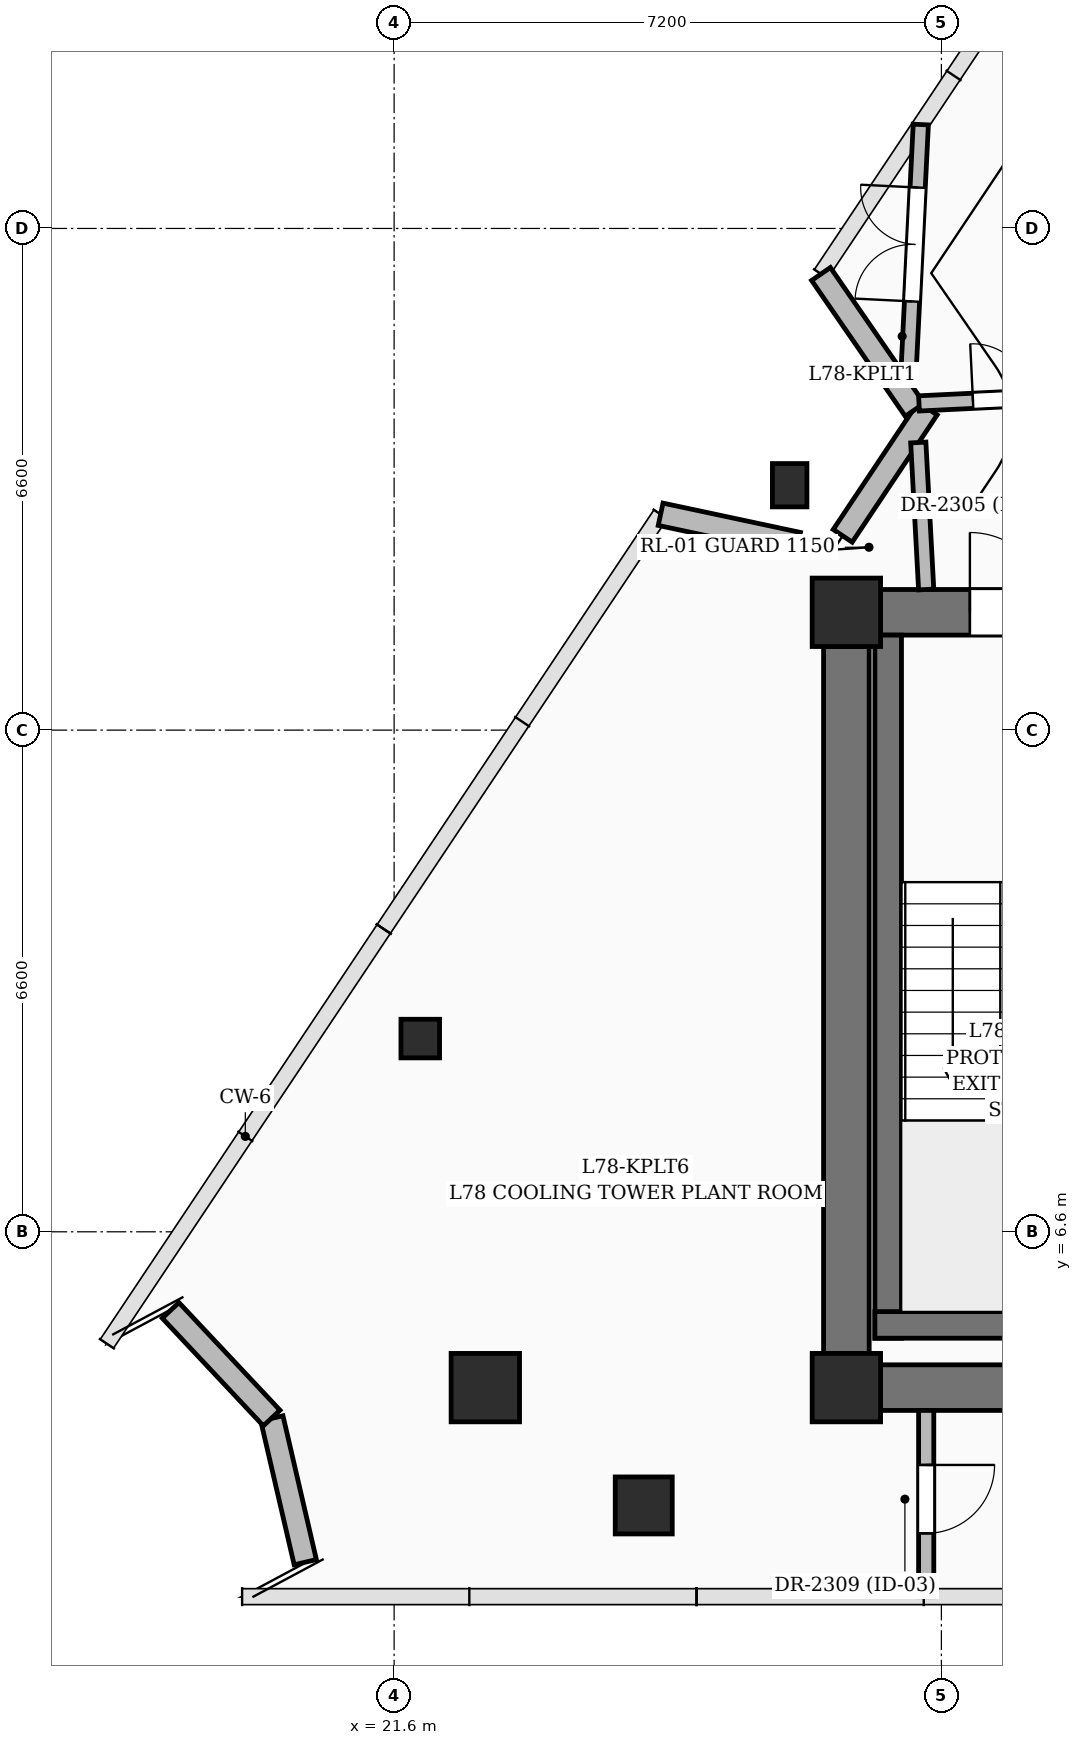
"""IFC4 building model, lengths in metres.
Left out: names, types, materials, properties, quantities, classifications, styles, units other than length and angle.
Written with IfcOpenShell. Run it as: python <this file> out.ifc"""

import sys

from ifc_helpers import new_model, si_unit, direction, frame, frame_2d, origin, origin_2d, place, context, subcontext, project, spatial, rectangle, hollow_circle, i_section, extrude, element, fill, save


model = new_model("IFC4")
c1 = context("Model", 3, precision=1e-05, world=origin(), true_north=direction((0.0, 1.0)))
c2 = subcontext(c1, "Body", "Model", "MODEL_VIEW")
j1 = project(units=[si_unit("LENGTHUNIT", "METRE"), si_unit("PLANEANGLEUNIT", "RADIAN")], contexts=[c1])
p1 = place(None, origin())
s1 = spatial("IfcSite", under=j1, at=p1, CompositionType="ELEMENT")
p2 = place(p1, origin())
s2 = spatial("IfcBuilding", under=s1, at=p2, CompositionType="ELEMENT")
p3 = place(p2, frame((0.0, 0.0, 302.5)))
s3 = spatial("IfcBuildingStorey", under=s2, at=p3, CompositionType="ELEMENT", Elevation=302.5)
for number, where, z_axis, x_axis in (
    (1, (27.55, 4.55, 0.0), (0.0, 0.0, 1.0), (1.0, 0.0, 0.0)),
    (2, (27.55, 14.75, 0.0), (0.0, 0.0, 1.0), (1.0, 0.0, 0.0)),
    (3, (22.8, 4.55, 0.0), (0.0, 0.0, 1.0), (1.0, 0.0, 0.0)),
):
    element("IfcColumn", number, at=place(p3, frame(where, z_axis=z_axis, x_axis=x_axis)), inside=s3, PredefinedType="COLUMN", context=c2, shape_type="SweptSolid", body=[
        extrude(rectangle(XDim=0.9, YDim=0.9, at=origin_2d()), origin(), (0.0, 0.0, 1.0), 4.0),
    ])
p4 = place(p3, frame((28.0, 4.55, 0.0), z_axis=(0.0, 0.0, 1.0), x_axis=(1.0, 0.0, 0.0)))
e4 = element("IfcWall", 4, at=p4, inside=s3, PredefinedType="SHEAR", context=c2, shape_type="SweptSolid", body=[
    extrude(rectangle(XDim=6.7, YDim=0.6, at=frame_2d((3.35, 0.0))), origin(), (0.0, 0.0, 1.0), 4.0),
])
p5 = place(p3, frame((28.0, 14.75, 0.0), z_axis=(0.0, 0.0, 1.0), x_axis=(1.0, 0.0, 0.0)))
e5 = element("IfcWall", 5, at=p5, inside=s3, PredefinedType="SHEAR", context=c2, shape_type="SweptSolid", body=[
    extrude(rectangle(XDim=6.7, YDim=0.6, at=frame_2d((3.35, 0.0))), origin(), (0.0, 0.0, 1.0), 4.0),
])
p6 = place(p5, frame((1.175, 0.0, 0.0)))
e6 = element("IfcOpeningElement", 6, at=p6, cuts=e5, PredefinedType="OPENING", context=c2, shape_type="SweptSolid", body=[
    extrude(rectangle(XDim=1.05, YDim=2.15, at=frame_2d((0.525, 1.075))), frame((0.0, 0.31, 0.0), z_axis=(0.0, -1.0, 0.0), x_axis=(1.0, 0.0, 0.0)), (0.0, 0.0, 1.0), 0.62),
])
p7 = place(p5, frame((5.025, 0.0, 0.0)))
e7 = element("IfcOpeningElement", 7, at=p7, cuts=e5, PredefinedType="OPENING", context=c2, shape_type="SweptSolid", body=[
    extrude(rectangle(XDim=0.95, YDim=2.15, at=frame_2d((0.475, 1.075))), frame((0.0, 0.31, 0.0), z_axis=(0.0, -1.0, 0.0), x_axis=(1.0, 0.0, 0.0)), (0.0, 0.0, 1.0), 0.62),
])
p8 = place(p3, frame((27.55, 5.0, 0.0), z_axis=(0.0, 0.0, 1.0), x_axis=(0.0, 1.0, 0.0)))
e8 = element("IfcWall", 8, at=p8, inside=s3, PredefinedType="SHEAR", context=c2, shape_type="SweptSolid", body=[
    extrude(rectangle(XDim=9.3, YDim=0.6, at=frame_2d((4.65, 0.0))), origin(), (0.0, 0.0, 1.0), 4.0),
])
p9 = place(p3, frame((28.1, 5.2, 0.0), z_axis=(0.0, 0.0, 1.0), x_axis=(0.0, 1.0, 0.0)))
e9 = element("IfcWall", 9, at=p9, inside=s3, PredefinedType="SOLIDWALL", context=c2, shape_type="SweptSolid", body=[
    extrude(rectangle(XDim=9.25, YDim=0.35, at=frame_2d((4.625, 0.0))), origin(), (0.0, 0.0, 1.0), 4.0),
])
p10 = place(p3, frame((27.925, 5.375, 0.0), z_axis=(0.0, 0.0, 1.0), x_axis=(1.0, 0.0, 0.0)))
e10 = element("IfcWall", 10, at=p10, inside=s3, PredefinedType="SOLIDWALL", context=c2, shape_type="SweptSolid", body=[
    extrude(rectangle(XDim=3.55, YDim=0.35, at=frame_2d((1.775, 0.0))), origin(), (0.0, 0.0, 1.0), 4.0),
])
p11 = place(p3, frame((24.884, 3.0, 0.0), z_axis=(0.0, 0.0, 1.0), x_axis=(1.0, 0.0, 0.0)))
e11 = element("IfcColumn", 11, at=p11, inside=s3, PredefinedType="COLUMN", context=c2, shape_type="SweptSolid", body=[
    extrude(rectangle(XDim=0.75, YDim=0.75, at=origin_2d()), origin(), (0.0, 0.0, 1.0), 4.0),
])
p12 = place(p3, frame((26.804, 16.422, 0.0), z_axis=(0.0, 0.0, 1.0), x_axis=(1.0, 0.0, 0.0)))
e12 = element("IfcColumn", 12, at=p12, inside=s3, PredefinedType="COLUMN", context=c2, shape_type="SweptSolid", body=[
    extrude(i_section(OverallWidth=0.454, OverallDepth=0.57, WebThickness=0.078, FlangeThickness=0.094, FilletRadius=0.02, at=origin_2d()), origin(), (0.0, 0.0, 1.0), 4.0),
])
p13 = place(p3, frame((21.944, 9.142, 0.0), z_axis=(0.0, 0.0, 1.0), x_axis=(1.0, 0.0, 0.0)))
e13 = element("IfcColumn", 13, at=p13, inside=s3, PredefinedType="COLUMN", context=c2, shape_type="SweptSolid", body=[
    extrude(hollow_circle(Radius=0.254, WallThickness=0.016, at=origin_2d()), origin(), (0.0, 0.0, 1.0), 4.0),
])
p14 = place(p3, frame((25.106, 16.04, 0.0), z_axis=(0.0, 0.0, 1.0), x_axis=(0.978002892231, -0.208591329607, 0.0)))
e14 = element("IfcWall", 14, at=p14, inside=s3, PredefinedType="SOLIDWALL", context=c2, shape_type="SweptSolid", body=[
    extrude(rectangle(XDim=1.849, YDim=0.3, at=frame_2d((0.925, 0.0))), origin(), (0.0, 0.0, 1.0), 2.982),
])
p15 = place(p3, frame((27.502, 15.756, 0.0), z_axis=(0.0, 0.0, 1.0), x_axis=(0.555175962623, 0.831732920189, 0.0)))
e15 = element("IfcWall", 15, at=p15, inside=s3, PredefinedType="SOLIDWALL", context=c2, shape_type="SweptSolid", body=[
    extrude(rectangle(XDim=2.013, YDim=0.3, at=frame_2d((1.006, 0.0))), origin(), (0.0, 0.0, 1.0), 3.04),
])
p16 = place(p3, frame((28.448, 17.414, 0.0), z_axis=(0.0, 0.0, 1.0), x_axis=(-0.56781706626, 0.823154772363, 0.0)))
e16 = element("IfcWall", 16, at=p16, inside=s3, PredefinedType="SOLIDWALL", context=c2, shape_type="SweptSolid", body=[
    extrude(rectangle(XDim=2.17, YDim=0.3, at=frame_2d((1.085, 0.0))), origin(), (0.0, 0.0, 1.0), 2.982),
])
p17 = place(p3, frame((20.431, 2.253, 0.0), z_axis=(0.0, 0.0, 1.0), x_axis=(-0.226355436514, 0.97404477123, 0.0)))
e17 = element("IfcWall", 17, at=p17, inside=s3, PredefinedType="SOLIDWALL", context=c2, shape_type="SweptSolid", body=[
    extrude(rectangle(XDim=1.943, YDim=0.3, at=frame_2d((0.971, 0.0))), origin(), (0.0, 0.0, 1.0), 3.7),
])
p18 = place(p3, frame((19.989, 4.15, 0.0), z_axis=(0.0, 0.0, 1.0), x_axis=(-0.684517683679, 0.728996255636, 0.0)))
e18 = element("IfcWall", 18, at=p18, inside=s3, PredefinedType="SOLIDWALL", context=c2, shape_type="SweptSolid", body=[
    extrude(rectangle(XDim=1.943, YDim=0.3, at=frame_2d((0.972, 0.0))), origin(), (0.0, 0.0, 1.0), 3.7),
])
p19 = place(p3, frame((28.362, 17.795, 0.0), z_axis=(0.0, 0.0, 1.0), x_axis=(0.049461540964, 0.99877602893, 0.0)))
e19 = element("IfcWall", 19, at=p19, inside=s3, PredefinedType="PARTITIONING", context=c2, shape_type="SweptSolid", body=[
    extrude(rectangle(XDim=3.376, YDim=0.2, at=frame_2d((1.688, 0.0))), origin(), (0.0, 0.0, 1.0), 2.977),
])
p20 = place(p19, frame((1.046, 0.0, 0.0)))
e20 = element("IfcOpeningElement", 20, at=p20, cuts=e19, PredefinedType="OPENING", context=c2, shape_type="SweptSolid", body=[
    extrude(rectangle(XDim=1.5, YDim=2.2, at=frame_2d((0.75, 1.1))), frame((0.0, 0.11, 0.0), z_axis=(0.0, -1.0, 0.0), x_axis=(1.0, 0.0, 0.0)), (0.0, 0.0, 1.0), 0.22),
])
p21 = place(p3, frame((28.6, 4.25, 0.0), z_axis=(0.0, 0.0, 1.0), x_axis=(0.0, -1.0, 0.0)))
e21 = element("IfcWall", 21, at=p21, inside=s3, PredefinedType="PARTITIONING", context=c2, shape_type="SweptSolid", body=[
    extrude(rectangle(XDim=2.45, YDim=0.2, at=frame_2d((1.225, 0.0))), origin(), (0.0, 0.0, 1.0), 2.977),
])
p22 = place(p21, frame((0.717, 0.0, 0.0)))
e22 = element("IfcOpeningElement", 22, at=p22, cuts=e21, PredefinedType="OPENING", context=c2, shape_type="SweptSolid", body=[
    extrude(rectangle(XDim=0.9, YDim=2.1, at=frame_2d((0.45, 1.05))), frame((0.0, 0.11, 0.0), z_axis=(0.0, -1.0, 0.0), x_axis=(1.0, 0.0, 0.0)), (0.0, 0.0, 1.0), 0.22),
])
p23 = place(p3, frame((28.505, 17.498, 0.0), z_axis=(0.0, 0.0, 1.0), x_axis=(0.998829596157, 0.04836773553, 0.0)))
e23 = element("IfcWall", 23, at=p23, inside=s3, PredefinedType="PARTITIONING", context=c2, shape_type="SweptSolid", body=[
    extrude(rectangle(XDim=3.064, YDim=0.2, at=frame_2d((1.532, 0.0))), origin(), (0.0, 0.0, 1.0), 3.035),
])
p24 = place(p23, frame((0.711, 0.0, 0.0)))
e24 = element("IfcOpeningElement", 24, at=p24, cuts=e23, PredefinedType="OPENING", context=c2, shape_type="SweptSolid", body=[
    extrude(rectangle(XDim=1.5, YDim=2.2, at=frame_2d((0.75, 1.1))), frame((0.0, 0.11, 0.0), z_axis=(0.0, -1.0, 0.0), x_axis=(1.0, 0.0, 0.0)), (0.0, 0.0, 1.0), 0.22),
])
p25 = place(p3, frame((28.496, 16.984, 0.0), z_axis=(0.0, 0.0, 1.0), x_axis=(0.053703478209, -0.998556926984, 0.0)))
e25 = element("IfcWall", 25, at=p25, inside=s3, PredefinedType="PARTITIONING", context=c2, shape_type="SweptSolid", body=[
    extrude(rectangle(XDim=1.937, YDim=0.2, at=frame_2d((0.968, 0.0))), origin(), (0.0, 0.0, 1.0), 3.035),
])
p26 = place(p6, origin())
e26 = element("IfcDoor", 26, at=p26, inside=s3, OperationType="SINGLE_SWING_LEFT", PredefinedType="DOOR", context=c2, shape_type="SweptSolid", body=[
    extrude(rectangle(XDim=1.05, YDim=2.15, at=frame_2d((0.525, 1.075))), frame((0.0, 0.025, 0.0), z_axis=(0.0, -1.0, 0.0), x_axis=(1.0, 0.0, 0.0)), (0.0, 0.0, 1.0), 0.05),
])
fill(e6, e26)
p27 = place(p24, origin())
e27 = element("IfcDoor", 27, at=p27, inside=s3, OperationType="DOUBLE_DOOR_SINGLE_SWING", PredefinedType="DOOR", context=c2, shape_type="SweptSolid", body=[
    extrude(rectangle(XDim=1.5, YDim=2.2, at=frame_2d((0.75, 1.1))), frame((0.0, 0.025, 0.0), z_axis=(0.0, -1.0, 0.0), x_axis=(1.0, 0.0, 0.0)), (0.0, 0.0, 1.0), 0.05),
])
fill(e24, e27)
p28 = place(p20, origin())
e28 = element("IfcDoor", 28, at=p28, inside=s3, OperationType="DOUBLE_DOOR_SINGLE_SWING", PredefinedType="DOOR", context=c2, shape_type="SweptSolid", body=[
    extrude(rectangle(XDim=1.5, YDim=2.2, at=frame_2d((0.75, 1.1))), frame((0.0, 0.025, 0.0), z_axis=(0.0, -1.0, 0.0), x_axis=(1.0, 0.0, 0.0)), (0.0, 0.0, 1.0), 0.05),
])
fill(e20, e28)
p29 = place(p22, origin())
e29 = element("IfcDoor", 29, at=p29, inside=s3, OperationType="SINGLE_SWING_LEFT", PredefinedType="DOOR", context=c2, shape_type="SweptSolid", body=[
    extrude(rectangle(XDim=0.9, YDim=2.1, at=frame_2d((0.45, 1.05))), frame((0.0, 0.025, 0.0), z_axis=(0.0, -1.0, 0.0), x_axis=(1.0, 0.0, 0.0)), (0.0, 0.0, 1.0), 0.05),
])
fill(e22, e29)
save(model, sys.argv[1])
